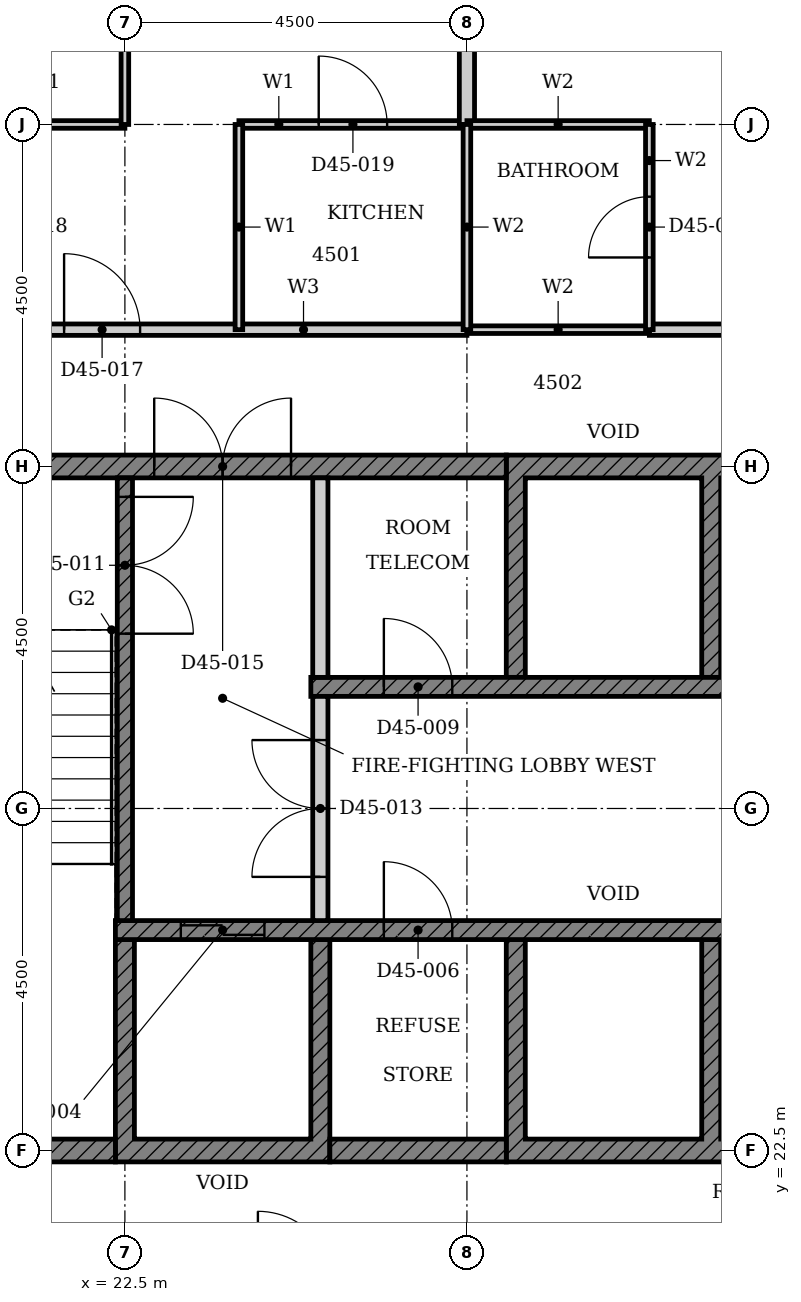
"""IFC4 building model, lengths in metres.
Left out: names, types, materials, properties, quantities, classifications, styles, units other than length and angle.
Written with IfcOpenShell. Run it as: python <this file> out.ifc"""

import sys

from ifc_helpers import new_model, si_unit, direction, frame, frame_2d, origin, place, context, subcontext, project, spatial, polyline, rectangle, outline, extrude, element, fill, save


model = new_model("IFC4")
c1 = context("Model", 3, precision=1e-05, world=origin(), true_north=direction((0.0, 1.0)))
c2 = subcontext(c1, "Body", "Model", "MODEL_VIEW")
j1 = project(units=[si_unit("LENGTHUNIT", "METRE"), si_unit("PLANEANGLEUNIT", "RADIAN")], contexts=[c1])
p1 = place(None, origin())
s1 = spatial("IfcSite", under=j1, at=p1, CompositionType="ELEMENT")
p2 = place(p1, origin())
s2 = spatial("IfcBuilding", under=s1, at=p2, CompositionType="ELEMENT")
p3 = place(p2, frame((0.0, 0.0, 180.2)))
s3 = spatial("IfcBuildingStorey", under=s2, at=p3, CompositionType="ELEMENT", Elevation=180.2)
p4 = place(p3, origin())
e1 = element("IfcWall", 1, at=p4, inside=s3, PredefinedType="SHEAR", context=c2, shape_type="SweptSolid", body=[
    extrude(outline(polyline([(22.375, 22.35), (25.197, 22.35), (25.197, 25.275), (24.947, 25.275), (24.947, 22.65), (22.625, 22.65), (22.625, 25.275), (22.375, 25.275), (22.375, 22.35)])), origin(), (0.0, 0.0, 1.0), 3.4),
])
p5 = place(p3, origin())
e2 = element("IfcWall", 2, at=p5, inside=s3, PredefinedType="SHEAR", context=c2, shape_type="SweptSolid", body=[
    extrude(outline(polyline([(27.518, 22.35), (32.911, 22.35), (32.911, 25.275), (32.661, 25.275), (32.661, 22.65), (30.339, 22.65), (30.339, 25.275), (30.089, 25.275), (30.089, 22.65), (27.768, 22.65), (27.768, 25.275), (27.518, 25.275), (27.518, 22.35)])), origin(), (0.0, 0.0, 1.0), 3.4),
])
p6 = place(p3, origin())
e3 = element("IfcWall", 3, at=p6, inside=s3, PredefinedType="SHEAR", context=c2, shape_type="SweptSolid", body=[
    extrude(outline(polyline([(27.518, 28.725), (27.768, 28.725), (27.768, 31.35), (30.089, 31.35), (30.089, 28.725), (30.339, 28.725), (30.339, 31.35), (32.661, 31.35), (32.661, 28.725), (32.911, 28.725), (32.911, 31.65), (27.518, 31.65), (27.518, 28.725)])), origin(), (0.0, 0.0, 1.0), 3.4),
])
p7 = place(p3, frame((18.15, 22.5, 0.0), z_axis=(0.0, 0.0, 1.0), x_axis=(1.0, 0.0, 0.0)))
e4 = element("IfcWall", 4, at=p7, inside=s3, PredefinedType="SHEAR", context=c2, shape_type="SweptSolid", body=[
    extrude(rectangle(XDim=4.225, YDim=0.3, at=frame_2d((2.113, 0.0))), origin(), (0.0, 0.0, 1.0), 3.4),
])
p8 = place(p3, frame((25.197, 22.5, 0.0), z_axis=(0.0, 0.0, 1.0), x_axis=(1.0, 0.0, 0.0)))
e5 = element("IfcWall", 5, at=p8, inside=s3, PredefinedType="SHEAR", context=c2, shape_type="SweptSolid", body=[
    extrude(rectangle(XDim=2.321, YDim=0.3, at=frame_2d((1.161, 0.0))), origin(), (0.0, 0.0, 1.0), 3.4),
])
p9 = place(p3, frame((18.15, 31.5, 0.0), z_axis=(0.0, 0.0, 1.0), x_axis=(1.0, 0.0, 0.0)))
e6 = element("IfcWall", 6, at=p9, inside=s3, PredefinedType="SHEAR", context=c2, shape_type="SweptSolid", body=[
    extrude(rectangle(XDim=9.368, YDim=0.3, at=frame_2d((4.684, 0.0))), origin(), (0.0, 0.0, 1.0), 3.4),
])
p10 = place(p9, frame((4.736, 0.0, 0.0)))
e7 = element("IfcOpeningElement", 7, at=p10, cuts=e6, PredefinedType="OPENING", context=c2, shape_type="SweptSolid", body=[
    extrude(rectangle(XDim=1.8, YDim=2.1, at=frame_2d((0.9, 1.05))), frame((0.0, 0.16, 0.0), z_axis=(0.0, -1.0, 0.0), x_axis=(1.0, 0.0, 0.0)), (0.0, 0.0, 1.0), 0.32),
])
p11 = place(p3, frame((22.375, 25.4, 0.0), z_axis=(0.0, 0.0, 1.0), x_axis=(1.0, 0.0, 0.0)))
e8 = element("IfcWall", 8, at=p11, inside=s3, PredefinedType="SHEAR", context=c2, shape_type="SweptSolid", body=[
    extrude(rectangle(XDim=15.678, YDim=0.25, at=frame_2d((7.839, 0.0))), origin(), (0.0, 0.0, 1.0), 3.4),
])
p12 = place(p11, frame((8.575, 0.0, 0.0)))
e9 = element("IfcOpeningElement", 9, at=p12, cuts=e8, PredefinedType="OPENING", context=c2, shape_type="SweptSolid", body=[
    extrude(rectangle(XDim=1.1, YDim=2.1, at=frame_2d((0.55, 1.05))), frame((0.0, 0.135, 0.0), z_axis=(0.0, -1.0, 0.0), x_axis=(1.0, 0.0, 0.0)), (0.0, 0.0, 1.0), 0.27),
])
p13 = place(p11, frame((0.861, 0.0, 0.0)))
e10 = element("IfcOpeningElement", 10, at=p13, cuts=e8, PredefinedType="OPENING", context=c2, shape_type="SweptSolid", body=[
    extrude(rectangle(XDim=1.1, YDim=2.1, at=frame_2d((0.55, 1.05))), frame((0.0, 0.135, 0.0), z_axis=(0.0, -1.0, 0.0), x_axis=(1.0, 0.0, 0.0)), (0.0, 0.0, 1.0), 0.27),
])
p14 = place(p11, frame((3.532, 0.0, 0.0)))
e11 = element("IfcOpeningElement", 11, at=p14, cuts=e8, PredefinedType="OPENING", context=c2, shape_type="SweptSolid", body=[
    extrude(rectangle(XDim=0.9, YDim=2.1, at=frame_2d((0.45, 1.05))), frame((0.0, 0.135, 0.0), z_axis=(0.0, -1.0, 0.0), x_axis=(1.0, 0.0, 0.0)), (0.0, 0.0, 1.0), 0.27),
])
p15 = place(p11, frame((11.246, 0.0, 0.0)))
e12 = element("IfcOpeningElement", 12, at=p15, cuts=e8, PredefinedType="OPENING", context=c2, shape_type="SweptSolid", body=[
    extrude(rectangle(XDim=0.9, YDim=2.1, at=frame_2d((0.45, 1.05))), frame((0.0, 0.135, 0.0), z_axis=(0.0, -1.0, 0.0), x_axis=(1.0, 0.0, 0.0)), (0.0, 0.0, 1.0), 0.27),
])
p16 = place(p11, frame((13.818, 0.0, 0.0)))
e13 = element("IfcOpeningElement", 13, at=p16, cuts=e8, PredefinedType="OPENING", context=c2, shape_type="SweptSolid", body=[
    extrude(rectangle(XDim=0.9, YDim=2.1, at=frame_2d((0.45, 1.05))), frame((0.0, 0.135, 0.0), z_axis=(0.0, -1.0, 0.0), x_axis=(1.0, 0.0, 0.0)), (0.0, 0.0, 1.0), 0.27),
])
p17 = place(p3, frame((24.947, 28.6, 0.0), z_axis=(0.0, 0.0, 1.0), x_axis=(1.0, 0.0, 0.0)))
e14 = element("IfcWall", 14, at=p17, inside=s3, PredefinedType="SHEAR", context=c2, shape_type="SweptSolid", body=[
    extrude(rectangle(XDim=15.678, YDim=0.25, at=frame_2d((7.839, 0.0))), origin(), (0.0, 0.0, 1.0), 3.4),
])
p18 = place(p17, frame((6.004, 0.0, 0.0)))
e15 = element("IfcOpeningElement", 15, at=p18, cuts=e14, PredefinedType="OPENING", context=c2, shape_type="SweptSolid", body=[
    extrude(rectangle(XDim=1.1, YDim=2.1, at=frame_2d((0.55, 1.05))), frame((0.0, 0.135, 0.0), z_axis=(0.0, -1.0, 0.0), x_axis=(1.0, 0.0, 0.0)), (0.0, 0.0, 1.0), 0.27),
])
p19 = place(p17, frame((11.146, 0.0, 0.0)))
e16 = element("IfcOpeningElement", 16, at=p19, cuts=e14, PredefinedType="OPENING", context=c2, shape_type="SweptSolid", body=[
    extrude(rectangle(XDim=1.1, YDim=2.1, at=frame_2d((0.55, 1.05))), frame((0.0, 0.135, 0.0), z_axis=(0.0, -1.0, 0.0), x_axis=(1.0, 0.0, 0.0)), (0.0, 0.0, 1.0), 0.27),
])
p20 = place(p17, frame((13.718, 0.0, 0.0)))
e17 = element("IfcOpeningElement", 17, at=p20, cuts=e14, PredefinedType="OPENING", context=c2, shape_type="SweptSolid", body=[
    extrude(rectangle(XDim=1.1, YDim=2.1, at=frame_2d((0.55, 1.05))), frame((0.0, 0.135, 0.0), z_axis=(0.0, -1.0, 0.0), x_axis=(1.0, 0.0, 0.0)), (0.0, 0.0, 1.0), 0.27),
])
p21 = place(p17, frame((0.961, 0.0, 0.0)))
e18 = element("IfcOpeningElement", 18, at=p21, cuts=e14, PredefinedType="OPENING", context=c2, shape_type="SweptSolid", body=[
    extrude(rectangle(XDim=0.9, YDim=2.1, at=frame_2d((0.45, 1.05))), frame((0.0, 0.135, 0.0), z_axis=(0.0, -1.0, 0.0), x_axis=(1.0, 0.0, 0.0)), (0.0, 0.0, 1.0), 0.27),
])
p22 = place(p17, frame((8.675, 0.0, 0.0)))
e19 = element("IfcOpeningElement", 19, at=p22, cuts=e14, PredefinedType="OPENING", context=c2, shape_type="SweptSolid", body=[
    extrude(rectangle(XDim=0.9, YDim=2.1, at=frame_2d((0.45, 1.05))), frame((0.0, 0.135, 0.0), z_axis=(0.0, -1.0, 0.0), x_axis=(1.0, 0.0, 0.0)), (0.0, 0.0, 1.0), 0.27),
])
p23 = place(p3, frame((25.072, 28.725, 0.0), z_axis=(0.0, 0.0, 1.0), x_axis=(0.0, 1.0, 0.0)))
e20 = element("IfcWall", 20, at=p23, inside=s3, PredefinedType="PARTITIONING", context=c2, shape_type="SweptSolid", body=[
    extrude(rectangle(XDim=2.625, YDim=0.2, at=frame_2d((1.312, 0.0))), origin(), (0.0, 0.0, 1.0), 3.4),
])
p24 = place(p3, frame((22.5, 31.35, 0.0), z_axis=(0.0, 0.0, 1.0), x_axis=(0.0, -1.0, 0.0)))
e21 = element("IfcWall", 21, at=p24, inside=s3, PredefinedType="SHEAR", context=c2, shape_type="SweptSolid", body=[
    extrude(rectangle(XDim=5.825, YDim=0.2, at=frame_2d((2.913, 0.0))), origin(), (0.0, 0.0, 1.0), 3.4),
])
p25 = place(p24, frame((0.25, 0.0, 0.0)))
e22 = element("IfcOpeningElement", 22, at=p25, cuts=e21, PredefinedType="OPENING", context=c2, shape_type="SweptSolid", body=[
    extrude(rectangle(XDim=1.8, YDim=2.1, at=frame_2d((0.9, 1.05))), frame((0.0, 0.11, 0.0), z_axis=(0.0, -1.0, 0.0), x_axis=(1.0, 0.0, 0.0)), (0.0, 0.0, 1.0), 0.22),
])
p26 = place(p3, frame((25.072, 25.525, 0.0), z_axis=(0.0, 0.0, 1.0), x_axis=(0.0, 1.0, 0.0)))
e23 = element("IfcWall", 23, at=p26, inside=s3, PredefinedType="PARTITIONING", context=c2, shape_type="SweptSolid", body=[
    extrude(rectangle(XDim=2.95, YDim=0.2, at=frame_2d((1.475, 0.0))), origin(), (0.0, 0.0, 1.0), 3.4),
])
p27 = place(p26, frame((0.575, 0.0, 0.0)))
e24 = element("IfcOpeningElement", 24, at=p27, cuts=e23, PredefinedType="OPENING", context=c2, shape_type="SweptSolid", body=[
    extrude(rectangle(XDim=1.8, YDim=2.1, at=frame_2d((0.9, 1.05))), frame((0.0, 0.11, 0.0), z_axis=(0.0, -1.0, 0.0), x_axis=(1.0, 0.0, 0.0)), (0.0, 0.0, 1.0), 0.22),
])
p28 = place(p3, frame((20.4, 33.3, 0.0), z_axis=(0.0, 0.0, 1.0), x_axis=(1.0, 0.0, 0.0)))
e25 = element("IfcWall", 25, at=p28, inside=s3, PredefinedType="PARTITIONING", context=c2, shape_type="SweptSolid", body=[
    extrude(rectangle(XDim=6.6, YDim=0.15, at=frame_2d((3.3, 0.0))), origin(), (0.0, 0.0, 1.0), 3.4),
])
p29 = place(p28, frame((1.3, 0.0, 0.0)))
e26 = element("IfcOpeningElement", 26, at=p29, cuts=e25, PredefinedType="OPENING", context=c2, shape_type="SweptSolid", body=[
    extrude(rectangle(XDim=1.0, YDim=2.2, at=frame_2d((0.5, 1.1))), frame((0.0, 0.085, 0.0), z_axis=(0.0, -1.0, 0.0), x_axis=(1.0, 0.0, 0.0)), (0.0, 0.0, 1.0), 0.17),
])
p30 = place(p3, frame((29.4, 33.3, 0.0), z_axis=(0.0, 0.0, 1.0), x_axis=(1.0, 0.0, 0.0)))
e27 = element("IfcWall", 27, at=p30, inside=s3, PredefinedType="PARTITIONING", context=c2, shape_type="SweptSolid", body=[
    extrude(rectangle(XDim=13.2, YDim=0.15, at=frame_2d((6.6, 0.0))), origin(), (0.0, 0.0, 1.0), 3.4),
])
p31 = place(p30, frame((1.3, 0.0, 0.0)))
e28 = element("IfcOpeningElement", 28, at=p31, cuts=e27, PredefinedType="OPENING", context=c2, shape_type="SweptSolid", body=[
    extrude(rectangle(XDim=1.0, YDim=2.2, at=frame_2d((0.5, 1.1))), frame((0.0, 0.085, 0.0), z_axis=(0.0, -1.0, 0.0), x_axis=(1.0, 0.0, 0.0)), (0.0, 0.0, 1.0), 0.17),
])
p32 = place(p30, frame((10.9, 0.0, 0.0)))
e29 = element("IfcOpeningElement", 29, at=p32, cuts=e27, PredefinedType="OPENING", context=c2, shape_type="SweptSolid", body=[
    extrude(rectangle(XDim=1.0, YDim=2.2, at=frame_2d((0.5, 1.1))), frame((0.0, 0.085, 0.0), z_axis=(0.0, -1.0, 0.0), x_axis=(1.0, 0.0, 0.0)), (0.0, 0.0, 1.0), 0.17),
])
p33 = place(p3, frame((20.4, 36.0, 0.0), z_axis=(0.0, 0.0, 1.0), x_axis=(1.0, 0.0, 0.0)))
e30 = element("IfcWall", 30, at=p33, inside=s3, PredefinedType="PARTITIONING", context=c2, shape_type="SweptSolid", body=[
    extrude(rectangle(XDim=2.1, YDim=0.1, at=frame_2d((1.05, 0.0))), origin(), (0.0, 0.0, 1.0), 3.4),
])
p34 = place(p3, frame((24.0, 36.0, 0.0), z_axis=(0.0, 0.0, 1.0), x_axis=(1.0, 0.0, 0.0)))
e31 = element("IfcWall", 31, at=p34, inside=s3, PredefinedType="PARTITIONING", context=c2, shape_type="SweptSolid", body=[
    extrude(rectangle(XDim=3.0, YDim=0.1, at=frame_2d((1.5, 0.0))), origin(), (0.0, 0.0, 1.0), 3.4),
])
p35 = place(p34, frame((1.05, 0.0, 0.0)))
e32 = element("IfcOpeningElement", 32, at=p35, cuts=e31, PredefinedType="OPENING", context=c2, shape_type="SweptSolid", body=[
    extrude(rectangle(XDim=0.9, YDim=2.1, at=frame_2d((0.45, 1.05))), frame((0.0, 0.06, 0.0), z_axis=(0.0, -1.0, 0.0), x_axis=(1.0, 0.0, 0.0)), (0.0, 0.0, 1.0), 0.12),
])
p36 = place(p3, frame((22.5, 36.0, 0.0), z_axis=(0.0, 0.0, 1.0), x_axis=(0.0, 1.0, 0.0)))
e33 = element("IfcWall", 33, at=p36, inside=s3, PredefinedType="PARTITIONING", context=c2, shape_type="SweptSolid", body=[
    extrude(rectangle(XDim=4.815, YDim=0.1, at=frame_2d((2.407, 0.0))), origin(), (0.0, 0.0, 1.0), 3.4),
])
p37 = place(p36, frame((1.8, 0.0, 0.0)))
e34 = element("IfcOpeningElement", 34, at=p37, cuts=e33, PredefinedType="OPENING", context=c2, shape_type="SweptSolid", body=[
    extrude(rectangle(XDim=0.9, YDim=2.1, at=frame_2d((0.45, 1.05))), frame((0.0, 0.06, 0.0), z_axis=(0.0, -1.0, 0.0), x_axis=(1.0, 0.0, 0.0)), (0.0, 0.0, 1.0), 0.12),
])
p38 = place(p3, frame((24.0, 33.3, 0.0), z_axis=(0.0, 0.0, 1.0), x_axis=(0.0, 1.0, 0.0)))
e35 = element("IfcWall", 35, at=p38, inside=s3, PredefinedType="PARTITIONING", context=c2, shape_type="SweptSolid", body=[
    extrude(rectangle(XDim=2.7, YDim=0.1, at=frame_2d((1.35, 0.0))), origin(), (0.0, 0.0, 1.0), 3.4),
])
p39 = place(p3, frame((27.0, 36.0, 0.0), z_axis=(0.0, 0.0, 1.0), x_axis=(0.0, 1.0, 0.0)))
e36 = element("IfcWall", 36, at=p39, inside=s3, PredefinedType="PARTITIONING", context=c2, shape_type="SweptSolid", body=[
    extrude(rectangle(XDim=4.69, YDim=0.2, at=frame_2d((2.345, 0.0))), origin(), (0.0, 0.0, 1.0), 3.4),
])
for number, where, z_axis, x_axis in (
    (37, (27.0, 33.3, 0.0), (0.0, 0.0, 1.0), (1.0, 0.0, 0.0)),
    (38, (27.0, 36.0, 0.0), (0.0, 0.0, 1.0), (1.0, 0.0, 0.0)),
):
    element("IfcWall", number, at=place(p3, frame(where, z_axis=z_axis, x_axis=x_axis)), inside=s3, PredefinedType="PARTITIONING", context=c2, shape_type="SweptSolid", body=[
        extrude(rectangle(XDim=2.4, YDim=0.1, at=frame_2d((1.2, 0.0))), origin(), (0.0, 0.0, 1.0), 3.4),
    ])
p40 = place(p3, frame((27.0, 33.3, 0.0), z_axis=(0.0, 0.0, 1.0), x_axis=(0.0, 1.0, 0.0)))
e39 = element("IfcWall", 39, at=p40, inside=s3, PredefinedType="PARTITIONING", context=c2, shape_type="SweptSolid", body=[
    extrude(rectangle(XDim=2.7, YDim=0.1, at=frame_2d((1.35, 0.0))), origin(), (0.0, 0.0, 1.0), 3.4),
])
p41 = place(p3, frame((29.4, 33.3, 0.0), z_axis=(0.0, 0.0, 1.0), x_axis=(0.0, 1.0, 0.0)))
e40 = element("IfcWall", 40, at=p41, inside=s3, PredefinedType="PARTITIONING", context=c2, shape_type="SweptSolid", body=[
    extrude(rectangle(XDim=2.7, YDim=0.1, at=frame_2d((1.35, 0.0))), origin(), (0.0, 0.0, 1.0), 3.4),
])
p42 = place(p41, frame((0.95, 0.0, 0.0)))
e41 = element("IfcOpeningElement", 41, at=p42, cuts=e40, PredefinedType="OPENING", context=c2, shape_type="SweptSolid", body=[
    extrude(rectangle(XDim=0.8, YDim=2.1, at=frame_2d((0.4, 1.05))), frame((0.0, 0.06, 0.0), z_axis=(0.0, -1.0, 0.0), x_axis=(1.0, 0.0, 0.0)), (0.0, 0.0, 1.0), 0.12),
])
p43 = place(p13, origin())
e42 = element("IfcDoor", 42, at=p43, inside=s3, OperationType="DOUBLE_DOOR_SLIDING", PredefinedType="DOOR", context=c2, shape_type="SweptSolid", body=[
    extrude(rectangle(XDim=1.1, YDim=2.1, at=frame_2d((0.55, 1.05))), frame((0.0, 0.025, 0.0), z_axis=(0.0, -1.0, 0.0), x_axis=(1.0, 0.0, 0.0)), (0.0, 0.0, 1.0), 0.05),
])
fill(e10, e42)
p44 = place(p14, origin())
e43 = element("IfcDoor", 43, at=p44, inside=s3, OperationType="SINGLE_SWING_LEFT", PredefinedType="DOOR", context=c2, shape_type="SweptSolid", body=[
    extrude(rectangle(XDim=0.9, YDim=2.1, at=frame_2d((0.45, 1.05))), frame((0.0, 0.025, 0.0), z_axis=(0.0, -1.0, 0.0), x_axis=(1.0, 0.0, 0.0)), (0.0, 0.0, 1.0), 0.05),
])
fill(e11, e43)
p45 = place(p21, origin())
e44 = element("IfcDoor", 44, at=p45, inside=s3, OperationType="SINGLE_SWING_LEFT", PredefinedType="DOOR", context=c2, shape_type="SweptSolid", body=[
    extrude(rectangle(XDim=0.9, YDim=2.1, at=frame_2d((0.45, 1.05))), frame((0.0, 0.025, 0.0), z_axis=(0.0, -1.0, 0.0), x_axis=(1.0, 0.0, 0.0)), (0.0, 0.0, 1.0), 0.05),
])
fill(e18, e44)
p46 = place(p25, origin())
e45 = element("IfcDoor", 45, at=p46, inside=s3, OperationType="DOUBLE_DOOR_SINGLE_SWING", PredefinedType="DOOR", context=c2, shape_type="SweptSolid", body=[
    extrude(rectangle(XDim=1.8, YDim=2.1, at=frame_2d((0.9, 1.05))), frame((0.0, 0.025, 0.0), z_axis=(0.0, -1.0, 0.0), x_axis=(1.0, 0.0, 0.0)), (0.0, 0.0, 1.0), 0.05),
])
fill(e22, e45)
p47 = place(p27, origin())
e46 = element("IfcDoor", 46, at=p47, inside=s3, OperationType="DOUBLE_DOOR_SINGLE_SWING", PredefinedType="DOOR", context=c2, shape_type="SweptSolid", body=[
    extrude(rectangle(XDim=1.8, YDim=2.1, at=frame_2d((0.9, 1.05))), frame((0.0, 0.025, 0.0), z_axis=(0.0, -1.0, 0.0), x_axis=(1.0, 0.0, 0.0)), (0.0, 0.0, 1.0), 0.05),
])
fill(e24, e46)
p48 = place(p10, origin())
e47 = element("IfcDoor", 47, at=p48, inside=s3, OperationType="DOUBLE_DOOR_SINGLE_SWING", PredefinedType="DOOR", context=c2, shape_type="SweptSolid", body=[
    extrude(rectangle(XDim=1.8, YDim=2.1, at=frame_2d((0.9, 1.05))), frame((0.0, 0.025, 0.0), z_axis=(0.0, -1.0, 0.0), x_axis=(1.0, 0.0, 0.0)), (0.0, 0.0, 1.0), 0.05),
])
fill(e7, e47)
p49 = place(p29, origin())
e48 = element("IfcDoor", 48, at=p49, inside=s3, OperationType="SINGLE_SWING_RIGHT", PredefinedType="DOOR", context=c2, shape_type="SweptSolid", body=[
    extrude(rectangle(XDim=1.0, YDim=2.2, at=frame_2d((0.5, 1.1))), frame((0.0, 0.025, 0.0), z_axis=(0.0, -1.0, 0.0), x_axis=(1.0, 0.0, 0.0)), (0.0, 0.0, 1.0), 0.05),
])
fill(e26, e48)
p50 = place(p35, origin())
e49 = element("IfcDoor", 49, at=p50, inside=s3, OperationType="SINGLE_SWING_LEFT", PredefinedType="DOOR", context=c2, shape_type="SweptSolid", body=[
    extrude(rectangle(XDim=0.9, YDim=2.1, at=frame_2d((0.45, 1.05))), frame((0.0, 0.025, 0.0), z_axis=(0.0, -1.0, 0.0), x_axis=(1.0, 0.0, 0.0)), (0.0, 0.0, 1.0), 0.05),
])
fill(e32, e49)
p51 = place(p42, origin())
e50 = element("IfcDoor", 50, at=p51, inside=s3, OperationType="SINGLE_SWING_RIGHT", PredefinedType="DOOR", context=c2, shape_type="SweptSolid", body=[
    extrude(rectangle(XDim=0.8, YDim=2.1, at=frame_2d((0.4, 1.05))), frame((0.0, 0.025, 0.0), z_axis=(0.0, -1.0, 0.0), x_axis=(1.0, 0.0, 0.0)), (0.0, 0.0, 1.0), 0.05),
])
fill(e41, e50)
save(model, sys.argv[1])
